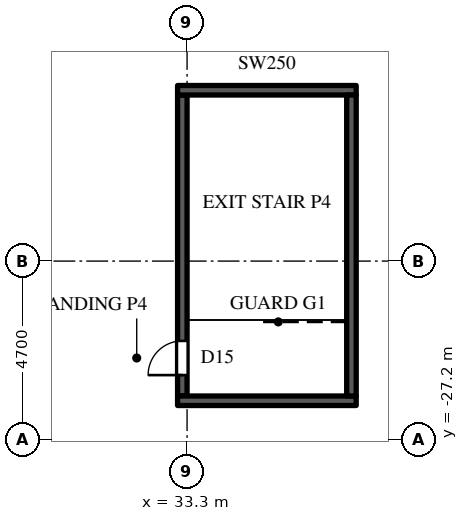
"""IFC4 building model, lengths in metres.
Left out: names, types, materials, properties, quantities, classifications, styles, units other than length and angle.
Written with IfcOpenShell. Run it as: python <this file> out.ifc"""

import sys

from ifc_helpers import new_model, si_unit, direction, frame, frame_2d, origin, place, context, subcontext, project, spatial, rectangle, extrude, element, fill, save


model = new_model("IFC4")
c1 = context("Model", 3, precision=1e-05, world=origin(), true_north=direction((0.0, 1.0)))
c2 = subcontext(c1, "Body", "Model", "MODEL_VIEW")
j1 = project(units=[si_unit("LENGTHUNIT", "METRE"), si_unit("PLANEANGLEUNIT", "RADIAN")], contexts=[c1])
p1 = place(None, origin())
s1 = spatial("IfcSite", under=j1, at=p1, CompositionType="ELEMENT")
p2 = place(p1, origin())
s2 = spatial("IfcBuilding", under=s1, at=p2, CompositionType="ELEMENT")
p3 = place(p2, frame((0.0, 0.0, 50.0)))
s3 = spatial("IfcBuildingStorey", under=s2, at=p3, CompositionType="ELEMENT", Elevation=50.0)
p4 = place(p3, frame((33.175, -26.05, 0.0), z_axis=(0.0, 0.0, 1.0), x_axis=(0.0, 1.0, 0.0)))
e1 = element("IfcWall", 1, at=p4, inside=s3, PredefinedType="SHEAR", context=c2, shape_type="SweptSolid", body=[
    extrude(rectangle(XDim=7.92, YDim=0.25, at=frame_2d((3.96, 0.0))), origin(), (0.0, 0.0, 1.0), 5.2),
])
p5 = place(p4, frame((0.55, 0.0, 0.0)))
e2 = element("IfcOpeningElement", 2, at=p5, cuts=e1, PredefinedType="OPENING", context=c2, shape_type="SweptSolid", body=[
    extrude(rectangle(XDim=0.9, YDim=2.2, at=frame_2d((0.45, 1.1))), frame((0.0, 0.135, 0.0), z_axis=(0.0, -1.0, 0.0), x_axis=(1.0, 0.0, 0.0)), (0.0, 0.0, 1.0), 0.27),
])
for number, where, z_axis, x_axis in (
    (3, (33.05, -26.175, 0.0), (0.0, 0.0, 1.0), (1.0, 0.0, 0.0)),
    (4, (33.05, -18.005, 0.0), (0.0, 0.0, 1.0), (1.0, 0.0, 0.0)),
):
    element("IfcWall", number, at=place(p3, frame(where, z_axis=z_axis, x_axis=x_axis)), inside=s3, PredefinedType="SHEAR", context=c2, shape_type="SweptSolid", body=[
        extrude(rectangle(XDim=4.7, YDim=0.25, at=frame_2d((2.35, 0.0))), origin(), (0.0, 0.0, 1.0), 5.2),
    ])
p6 = place(p3, frame((37.625, -26.05, 0.0), z_axis=(0.0, 0.0, 1.0), x_axis=(0.0, 1.0, 0.0)))
e5 = element("IfcWall", 5, at=p6, inside=s3, PredefinedType="SHEAR", context=c2, shape_type="SweptSolid", body=[
    extrude(rectangle(XDim=7.92, YDim=0.25, at=frame_2d((3.96, 0.0))), origin(), (0.0, 0.0, 1.0), 5.2),
])
p7 = place(p5, origin())
e6 = element("IfcDoor", 6, at=p7, inside=s3, OperationType="SINGLE_SWING_LEFT", PredefinedType="DOOR", context=c2, shape_type="SweptSolid", body=[
    extrude(rectangle(XDim=0.9, YDim=2.2, at=frame_2d((0.45, 1.1))), frame((0.0, 0.025, 0.0), z_axis=(0.0, -1.0, 0.0), x_axis=(1.0, 0.0, 0.0)), (0.0, 0.0, 1.0), 0.05),
])
fill(e2, e6)
save(model, sys.argv[1])
